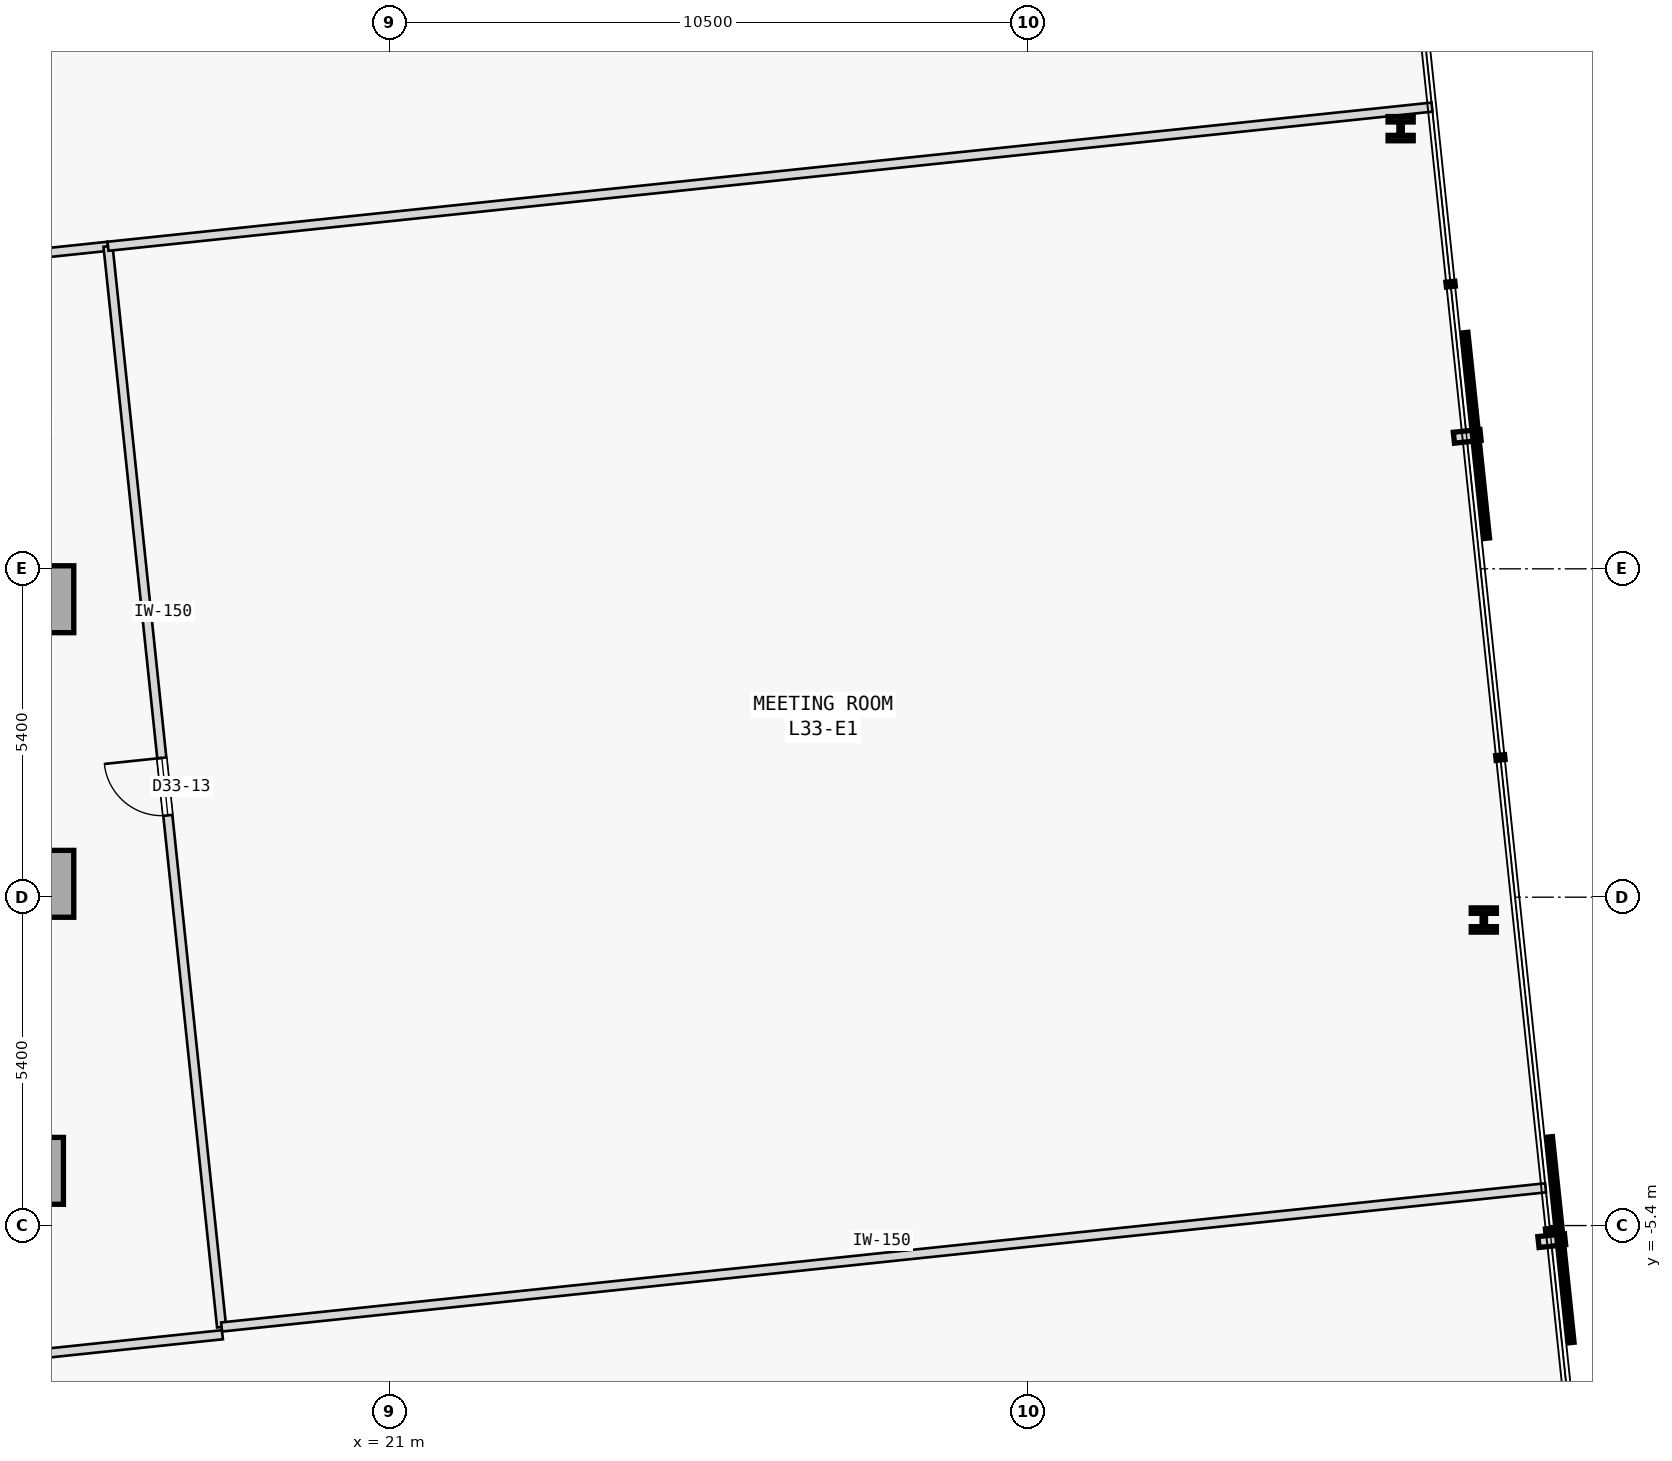
"""IFC4 building model, lengths in metres.
Left out: names, types, materials, properties, quantities, classifications, styles, units other than length and angle.
Written with IfcOpenShell. Run it as: python <this file> out.ifc"""

import sys

from ifc_helpers import new_model, si_unit, direction, frame, frame_2d, origin, origin_2d, place, context, subcontext, project, spatial, rectangle, i_section, extrude, element, fill, save


model = new_model("IFC4")
c1 = context("Model", 3, precision=1e-05, world=origin(), true_north=direction((0.0, 1.0)))
c2 = subcontext(c1, "Body", "Model", "MODEL_VIEW")
j1 = project(units=[si_unit("LENGTHUNIT", "METRE"), si_unit("PLANEANGLEUNIT", "RADIAN")], contexts=[c1])
p1 = place(None, origin())
s1 = spatial("IfcSite", under=j1, at=p1, CompositionType="ELEMENT")
p2 = place(p1, origin())
s2 = spatial("IfcBuilding", under=s1, at=p2, CompositionType="ELEMENT")
p3 = place(p2, frame((0.0, 0.0, 131.8)))
s3 = spatial("IfcBuildingStorey", under=s2, at=p3, CompositionType="ELEMENT", Elevation=131.8)
for number, where, z_axis, x_axis in (
    (1, (15.25, 4.9, 0.0), (0.0, 0.0, 1.0), (1.0, 0.0, 0.0)),
    (2, (15.25, 0.22, 0.0), (0.0, 0.0, 1.0), (1.0, 0.0, 0.0)),
    (3, (15.08, -4.5, 0.0), (0.0, 0.0, 1.0), (1.0, 0.0, 0.0)),
):
    element("IfcColumn", number, at=place(p3, frame(where, z_axis=z_axis, x_axis=x_axis)), inside=s3, PredefinedType="COLUMN", context=c2, shape_type="SweptSolid", body=[
        extrude(rectangle(XDim=1.1, YDim=1.1, at=origin_2d()), origin(), (0.0, 0.0, 1.0), 3.7),
    ])
for number, where, z_axis, x_axis in (
    (4, (38.988, -0.375, 0.0), (0.0, 0.0, 1.0), (1.0, 0.0, 0.0)),
    (5, (37.621, 12.638, 0.0), (0.0, 0.0, 1.0), (1.0, 0.0, 0.0)),
):
    element("IfcColumn", number, at=place(p3, frame(where, z_axis=z_axis, x_axis=x_axis)), inside=s3, PredefinedType="COLUMN", context=c2, shape_type="SweptSolid", body=[
        extrude(i_section(OverallWidth=0.413, OverallDepth=0.398, WebThickness=0.056, FlangeThickness=0.089, FilletRadius=0.015, at=origin_2d()), origin(), (0.0, 0.0, 1.0), 3.7),
    ])
p4 = place(p3, frame((-18.021, 7.09, 0.0), z_axis=(0.0, 0.0, 1.0), x_axis=(0.994522464549, 0.104523047737, 0.0)))
e6 = element("IfcWall", 6, at=p4, inside=s3, PredefinedType="PARTITIONING", context=c2, shape_type="SweptSolid", body=[
    extrude(rectangle(XDim=34.574, YDim=0.15, at=frame_2d((17.287, 0.0))), origin(), (0.0, 0.0, 1.0), 3.475),
])
p5 = place(p4, frame((16.812, 0.0, 0.0)))
e7 = element("IfcOpeningElement", 7, at=p5, cuts=e6, PredefinedType="OPENING", context=c2, shape_type="SweptSolid", body=[
    extrude(rectangle(XDim=0.95, YDim=2.15, at=frame_2d((0.475, 1.075))), frame((0.0, 0.085, 0.0), z_axis=(0.0, -1.0, 0.0), x_axis=(1.0, 0.0, 0.0)), (0.0, 0.0, 1.0), 0.17),
])
p6 = place(p3, frame((0.361, -9.075, 0.0), z_axis=(0.0, 0.0, 1.0), x_axis=(0.994523293042, 0.104515164432, 0.0)))
e8 = element("IfcWall", 8, at=p6, inside=s3, PredefinedType="PARTITIONING", context=c2, shape_type="SweptSolid", body=[
    extrude(rectangle(XDim=17.982, YDim=0.15, at=frame_2d((8.991, 0.0))), origin(), (0.0, 0.0, 1.0), 3.475),
])
p7 = place(p6, frame((5.819, 0.0, 0.0)))
e9 = element("IfcOpeningElement", 9, at=p7, cuts=e8, PredefinedType="OPENING", context=c2, shape_type="SweptSolid", body=[
    extrude(rectangle(XDim=0.95, YDim=2.15, at=frame_2d((0.475, 1.075))), frame((0.0, 0.085, 0.0), z_axis=(0.0, -1.0, 0.0), x_axis=(1.0, 0.0, 0.0)), (0.0, 0.0, 1.0), 0.17),
])
p8 = place(p3, frame((18.231, -7.068, 0.0), z_axis=(0.0, 0.0, 1.0), x_axis=(-0.104529034836, 0.994521835294, 0.0)))
e10 = element("IfcWall", 10, at=p8, inside=s3, PredefinedType="PARTITIONING", context=c2, shape_type="SweptSolid", body=[
    extrude(rectangle(XDim=17.87, YDim=0.15, at=frame_2d((8.935, 0.0))), origin(), (0.0, 0.0, 1.0), 3.475),
])
p9 = place(p8, frame((8.46, 0.0, 0.0)))
e11 = element("IfcOpeningElement", 11, at=p9, cuts=e10, PredefinedType="OPENING", context=c2, shape_type="SweptSolid", body=[
    extrude(rectangle(XDim=0.95, YDim=2.15, at=frame_2d((0.475, 1.075))), frame((0.0, 0.085, 0.0), z_axis=(0.0, -1.0, 0.0), x_axis=(1.0, 0.0, 0.0)), (0.0, 0.0, 1.0), 0.17),
])
p10 = place(p3, frame((16.363, 10.704, 0.0), z_axis=(0.0, 0.0, 1.0), x_axis=(0.994521206634, 0.104535015934, 0.0)))
e12 = element("IfcWall", 12, at=p10, inside=s3, PredefinedType="PARTITIONING", context=c2, shape_type="SweptSolid", body=[
    extrude(rectangle(XDim=21.893, YDim=0.15, at=frame_2d((10.946, 0.0))), origin(), (0.0, 0.0, 1.0), 3.475),
])
p11 = place(p3, frame((18.231, -7.068, 0.0), z_axis=(0.0, 0.0, 1.0), x_axis=(0.994521328491, 0.104533856601, 0.0)))
e13 = element("IfcWall", 13, at=p11, inside=s3, PredefinedType="PARTITIONING", context=c2, shape_type="SweptSolid", body=[
    extrude(rectangle(XDim=21.893, YDim=0.15, at=frame_2d((10.947, 0.0))), origin(), (0.0, 0.0, 1.0), 3.475),
])
p12 = place(p9, origin())
e14 = element("IfcDoor", 14, at=p12, inside=s3, OperationType="SINGLE_SWING_RIGHT", PredefinedType="DOOR", context=c2, shape_type="SweptSolid", body=[
    extrude(rectangle(XDim=0.95, YDim=2.15, at=frame_2d((0.475, 1.075))), frame((0.0, 0.025, 0.0), z_axis=(0.0, -1.0, 0.0), x_axis=(1.0, 0.0, 0.0)), (0.0, 0.0, 1.0), 0.05),
])
fill(e11, e14)
save(model, sys.argv[1])
